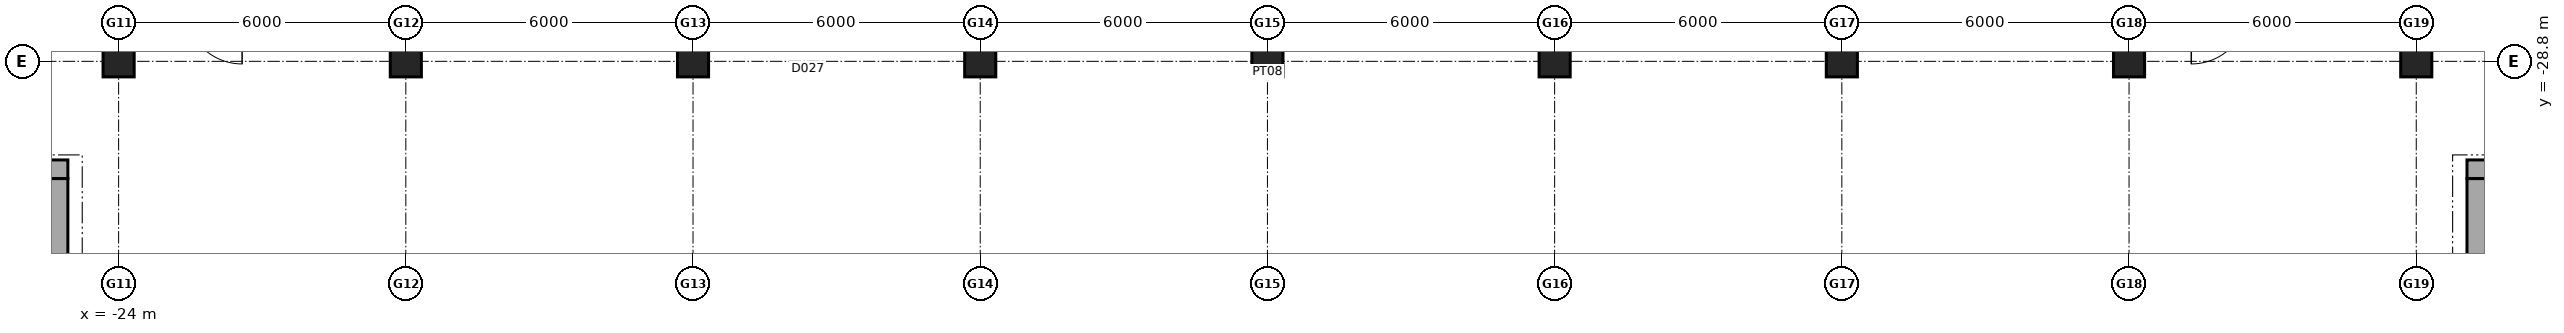
"""IFC4 building model, lengths in metres.
Left out: names, types, materials, properties, quantities, classifications, styles, units other than length and angle.
Written with IfcOpenShell. Run it as: python <this file> out.ifc"""

import sys

from ifc_helpers import new_model, si_unit, direction, frame, frame_2d, origin, origin_2d, place, context, subcontext, project, spatial, rectangle, extrude, element, save


model = new_model("IFC4")
c1 = context("Model", 3, precision=1e-05, world=origin(), true_north=direction((0.0, 1.0)))
c2 = subcontext(c1, "Body", "Model", "MODEL_VIEW")
j1 = project(units=[si_unit("LENGTHUNIT", "METRE"), si_unit("PLANEANGLEUNIT", "RADIAN")], contexts=[c1])
p1 = place(None, origin())
s1 = spatial("IfcSite", under=j1, at=p1, CompositionType="ELEMENT")
p2 = place(p1, origin())
s2 = spatial("IfcBuilding", under=s1, at=p2, CompositionType="ELEMENT")
p3 = place(p2, frame((0.0, 0.0, 10.2)))
s3 = spatial("IfcBuildingStorey", under=s2, at=p3, CompositionType="ELEMENT", Elevation=10.2)
for number, where, z_axis, x_axis in (
    (1, (-24.0, -28.8, 0.0), (0.0, 0.0, 1.0), (1.0, 0.0, 0.0)),
    (2, (-18.0, -28.8, 0.0), (0.0, 0.0, 1.0), (1.0, 0.0, 0.0)),
    (3, (-12.0, -28.8, 0.0), (0.0, 0.0, 1.0), (1.0, 0.0, 0.0)),
    (4, (-6.0, -28.8, 0.0), (0.0, 0.0, 1.0), (1.0, 0.0, 0.0)),
    (5, (0.0, -28.8, 0.0), (0.0, 0.0, 1.0), (1.0, 0.0, 0.0)),
    (6, (6.0, -28.8, 0.0), (0.0, 0.0, 1.0), (1.0, 0.0, 0.0)),
    (7, (12.0, -28.8, 0.0), (0.0, 0.0, 1.0), (1.0, 0.0, 0.0)),
    (8, (18.0, -28.8, 0.0), (0.0, 0.0, 1.0), (1.0, 0.0, 0.0)),
    (9, (24.0, -28.8, 0.0), (0.0, 0.0, 1.0), (1.0, 0.0, 0.0)),
):
    element("IfcColumn", number, at=place(p3, frame(where, z_axis=z_axis, x_axis=x_axis)), inside=s3, PredefinedType="COLUMN", context=c2, shape_type="SweptSolid", body=[
        extrude(rectangle(XDim=0.65, YDim=0.65, at=origin_2d()), origin(), (0.0, 0.0, 1.0), 4.8),
    ])
p4 = place(p3, frame((-28.54, -31.055, 0.0), z_axis=(0.0, 0.0, 1.0), x_axis=(1.0, 0.0, 0.0)))
e10 = element("IfcWall", 10, at=p4, inside=s3, PredefinedType="SHEAR", context=c2, shape_type="SweptSolid", body=[
    extrude(rectangle(XDim=3.48, YDim=0.39, at=frame_2d((1.74, 0.0))), origin(), (0.0, 0.0, 1.0), 4.8),
])
p5 = place(p4, frame((1.19, 0.0, 0.0)))
e11 = element("IfcOpeningElement", 11, at=p5, cuts=e10, PredefinedType="OPENING", context=c2, shape_type="SweptSolid", body=[
    extrude(rectangle(XDim=1.1, YDim=2.15, at=frame_2d((0.55, 1.075))), frame((0.0, 0.205, 0.0), z_axis=(0.0, -1.0, 0.0), x_axis=(1.0, 0.0, 0.0)), (0.0, 0.0, 1.0), 0.41),
])
p6 = place(p3, frame((-25.255, -31.25, 0.0), z_axis=(0.0, 0.0, 1.0), x_axis=(0.0, -1.0, 0.0)))
e12 = element("IfcWall", 12, at=p6, inside=s3, PredefinedType="SHEAR", context=c2, shape_type="SweptSolid", body=[
    extrude(rectangle(XDim=2.3, YDim=0.39, at=frame_2d((1.15, 0.0))), origin(), (0.0, 0.0, 1.0), 4.8),
])
p7 = place(p3, frame((25.06, -31.055, 0.0), z_axis=(0.0, 0.0, 1.0), x_axis=(1.0, 0.0, 0.0)))
e13 = element("IfcWall", 13, at=p7, inside=s3, PredefinedType="SHEAR", context=c2, shape_type="SweptSolid", body=[
    extrude(rectangle(XDim=3.48, YDim=0.39, at=frame_2d((1.74, 0.0))), origin(), (0.0, 0.0, 1.0), 4.8),
])
p8 = place(p7, frame((1.19, 0.0, 0.0)))
e14 = element("IfcOpeningElement", 14, at=p8, cuts=e13, PredefinedType="OPENING", context=c2, shape_type="SweptSolid", body=[
    extrude(rectangle(XDim=1.1, YDim=2.15, at=frame_2d((0.55, 1.075))), frame((0.0, 0.205, 0.0), z_axis=(0.0, -1.0, 0.0), x_axis=(1.0, 0.0, 0.0)), (0.0, 0.0, 1.0), 0.41),
])
p9 = place(p3, frame((25.255, -33.55, 0.0), z_axis=(0.0, 0.0, 1.0), x_axis=(0.0, 1.0, 0.0)))
e15 = element("IfcWall", 15, at=p9, inside=s3, PredefinedType="SHEAR", context=c2, shape_type="SweptSolid", body=[
    extrude(rectangle(XDim=2.3, YDim=0.39, at=frame_2d((1.15, 0.0))), origin(), (0.0, 0.0, 1.0), 4.8),
])
save(model, sys.argv[1])
